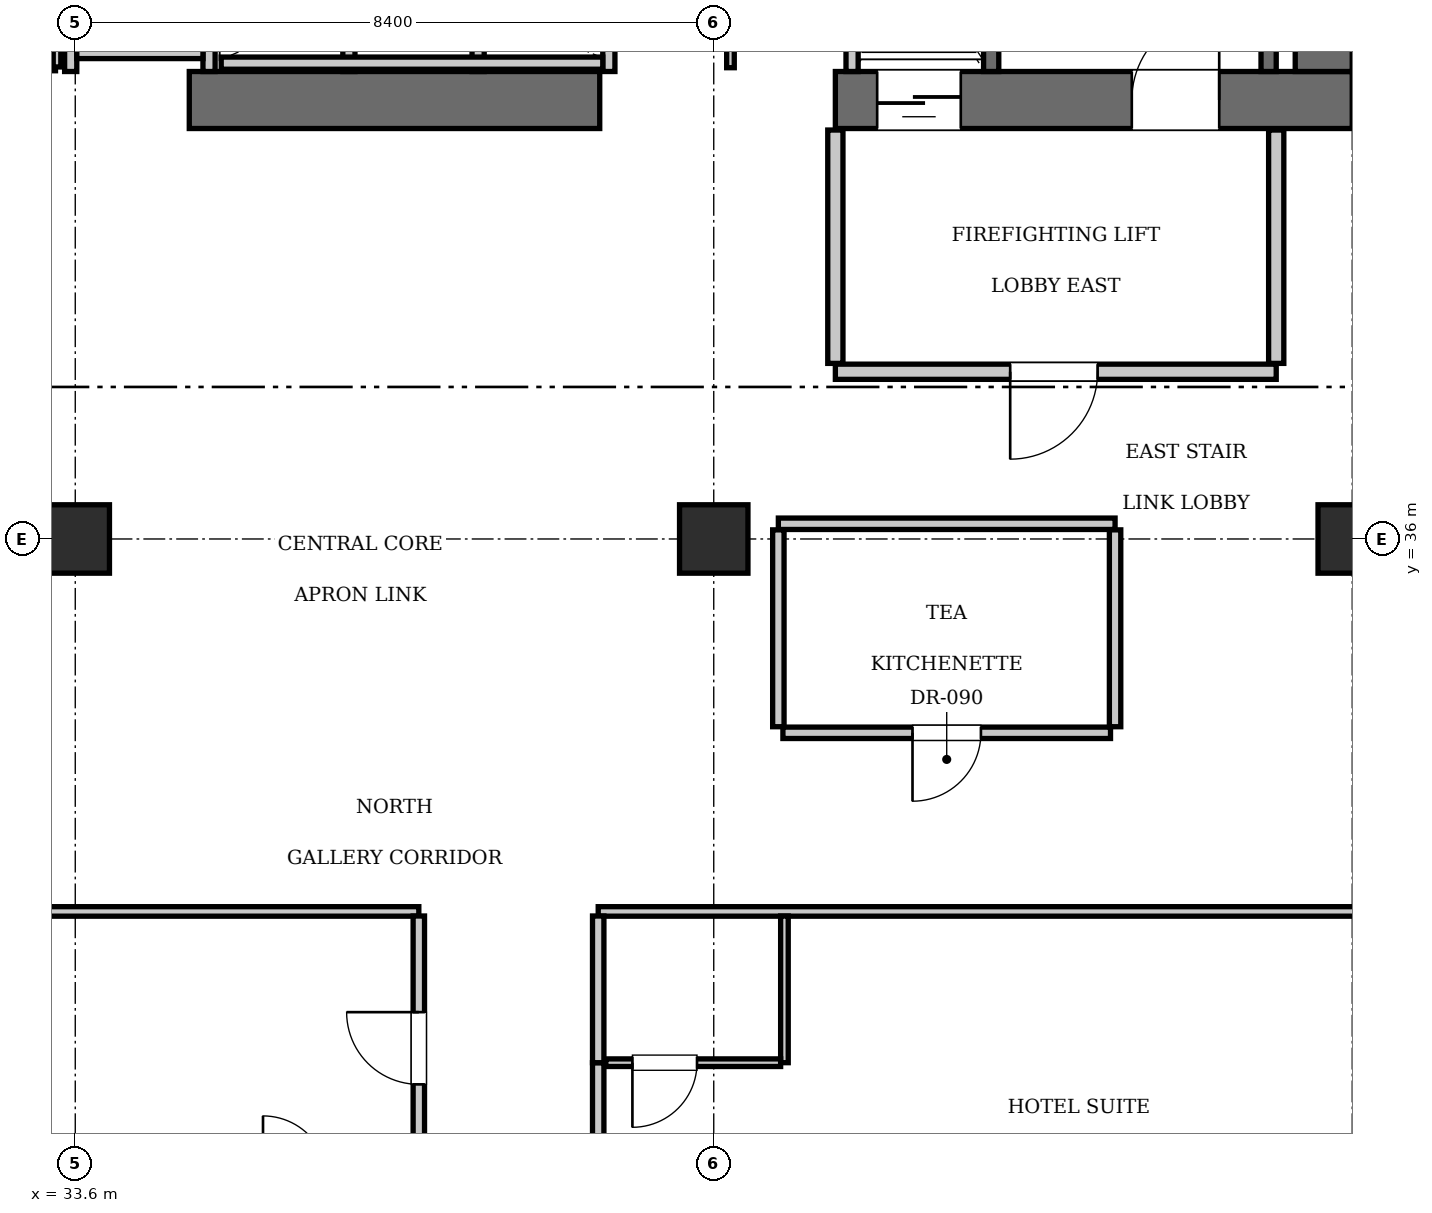
"""IFC4 building model, lengths in metres.
Left out: names, types, materials, properties, quantities, classifications, styles, units other than length and angle.
Written with IfcOpenShell. Run it as: python <this file> out.ifc"""

import sys

from ifc_helpers import new_model, si_unit, direction, frame, frame_2d, origin, origin_2d, place, context, subcontext, project, spatial, rectangle, extrude, element, fill, save


model = new_model("IFC4")
c1 = context("Model", 3, precision=1e-05, world=origin(), true_north=direction((0.0, 1.0)))
c2 = subcontext(c1, "Body", "Model", "MODEL_VIEW")
j1 = project(units=[si_unit("LENGTHUNIT", "METRE"), si_unit("PLANEANGLEUNIT", "RADIAN")], contexts=[c1])
p1 = place(None, origin())
s1 = spatial("IfcSite", under=j1, at=p1, CompositionType="ELEMENT")
p2 = place(p1, origin())
s2 = spatial("IfcBuilding", under=s1, at=p2, CompositionType="ELEMENT")
p3 = place(p2, frame((0.0, 0.0, 154.35)))
s3 = spatial("IfcBuildingStorey", under=s2, at=p3, CompositionType="ELEMENT", Elevation=154.35)
p4 = place(p3, frame((35.1, 41.775, 0.0), z_axis=(0.0, 0.0, 1.0), x_axis=(1.0, 0.0, 0.0)))
e1 = element("IfcWall", 1, at=p4, inside=s3, PredefinedType="SHEAR", context=c2, shape_type="SweptSolid", body=[
    extrude(rectangle(XDim=5.4, YDim=0.75, at=frame_2d((2.7, 0.0))), origin(), (0.0, 0.0, 1.0), 3.85),
])
p5 = place(p3, frame((43.6, 41.775, 0.0), z_axis=(0.0, 0.0, 1.0), x_axis=(1.0, 0.0, 0.0)))
e2 = element("IfcWall", 2, at=p5, inside=s3, PredefinedType="SHEAR", context=c2, shape_type="SweptSolid", body=[
    extrude(rectangle(XDim=6.8, YDim=0.75, at=frame_2d((3.4, 0.0))), origin(), (0.0, 0.0, 1.0), 3.85),
])
p6 = place(p5, frame((3.9, 0.0, 0.0)))
e3 = element("IfcOpeningElement", 3, at=p6, cuts=e2, PredefinedType="OPENING", context=c2, shape_type="SweptSolid", body=[
    extrude(rectangle(XDim=1.15, YDim=2.15, at=frame_2d((0.575, 1.075))), frame((0.0, 0.385, 0.0), z_axis=(0.0, -1.0, 0.0), x_axis=(1.0, 0.0, 0.0)), (0.0, 0.0, 1.0), 0.77),
])
p7 = place(p5, frame((0.55, 0.0, 0.0)))
e4 = element("IfcOpeningElement", 4, at=p7, cuts=e2, PredefinedType="OPENING", context=c2, shape_type="SweptSolid", body=[
    extrude(rectangle(XDim=1.1, YDim=2.2, at=frame_2d((0.55, 1.1))), frame((0.0, 0.385, 0.0), z_axis=(0.0, -1.0, 0.0), x_axis=(1.0, 0.0, 0.0)), (0.0, 0.0, 1.0), 0.77),
])
p8 = place(p3, frame((50.025, 42.15, 0.0), z_axis=(0.0, 0.0, 1.0), x_axis=(0.0, 1.0, 0.0)))
e5 = element("IfcWall", 5, at=p8, inside=s3, PredefinedType="SHEAR", context=c2, shape_type="SweptSolid", body=[
    extrude(rectangle(XDim=1.9, YDim=0.75, at=frame_2d((0.95, 0.0))), origin(), (0.0, 0.0, 1.0), 3.85),
])
for number, where, z_axis, x_axis in (
    (6, (33.6, 36.0, 0.0), (0.0, 0.0, 1.0), (1.0, 0.0, 0.0)),
    (7, (42.0, 36.0, 0.0), (0.0, 0.0, 1.0), (1.0, 0.0, 0.0)),
    (8, (50.4, 36.0, 0.0), (0.0, 0.0, 1.0), (1.0, 0.0, 0.0)),
):
    element("IfcColumn", number, at=place(p3, frame(where, z_axis=z_axis, x_axis=x_axis)), inside=s3, PredefinedType="COLUMN", context=c2, shape_type="SweptSolid", body=[
        extrude(rectangle(XDim=0.9, YDim=0.9, at=origin_2d()), origin(), (0.0, 0.0, 1.0), 3.85),
    ])
p9 = place(p3, frame((45.65, 42.15, 0.0), z_axis=(0.0, 0.0, 1.0), x_axis=(0.0, 1.0, 0.0)))
e9 = element("IfcWall", 9, at=p9, inside=s3, PredefinedType="SOLIDWALL", context=c2, shape_type="SweptSolid", body=[
    extrude(rectangle(XDim=9.0, YDim=0.2, at=frame_2d((4.5, 0.0))), origin(), (0.0, 0.0, 1.0), 3.61),
])
p10 = place(p3, frame((49.3, 42.15, 0.0), z_axis=(0.0, 0.0, 1.0), x_axis=(0.0, 1.0, 0.0)))
e10 = element("IfcWall", 10, at=p10, inside=s3, PredefinedType="SOLIDWALL", context=c2, shape_type="SweptSolid", body=[
    extrude(rectangle(XDim=1.87, YDim=0.2, at=frame_2d((0.935, 0.0))), origin(), (0.0, 0.0, 1.0), 3.61),
])
p11 = place(p3, frame((43.82, 42.15, 0.0), z_axis=(0.0, 0.0, 1.0), x_axis=(0.0, 1.0, 0.0)))
e11 = element("IfcWall", 11, at=p11, inside=s3, PredefinedType="SOLIDWALL", context=c2, shape_type="SweptSolid", body=[
    extrude(rectangle(XDim=2.59, YDim=0.16, at=frame_2d((1.295, 0.0))), origin(), (0.0, 0.0, 1.0), 3.61),
])
for number, where, z_axis, x_axis in (
    (12, (37.2, 42.15, 0.0), (0.0, 0.0, 1.0), (0.0, 1.0, 0.0)),
    (13, (38.9, 42.15, 0.0), (0.0, 0.0, 1.0), (0.0, 1.0, 0.0)),
    (14, (40.62, 42.15, 0.0), (0.0, 0.0, 1.0), (0.0, 1.0, 0.0)),
):
    element("IfcWall", number, at=place(p3, frame(where, z_axis=z_axis, x_axis=x_axis)), inside=s3, PredefinedType="SOLIDWALL", context=c2, shape_type="SweptSolid", body=[
        extrude(rectangle(XDim=2.2, YDim=0.16, at=frame_2d((1.1, 0.0))), origin(), (0.0, 0.0, 1.0), 3.61),
    ])
p12 = place(p3, frame((35.52, 42.26, 0.0), z_axis=(0.0, 0.0, 1.0), x_axis=(1.0, 0.0, 0.0)))
e15 = element("IfcWall", 15, at=p12, inside=s3, PredefinedType="SOLIDWALL", context=c2, shape_type="SweptSolid", body=[
    extrude(rectangle(XDim=5.02, YDim=0.16, at=frame_2d((2.51, 0.0))), origin(), (0.0, 0.0, 1.0), 3.61),
])
for number, where, z_axis, x_axis in (
    (16, (33.54, 42.15, 0.0), (0.0, 0.0, 1.0), (0.0, 1.0, 0.0)),
    (17, (35.36, 42.15, 0.0), (0.0, 0.0, 1.0), (0.0, 1.0, 0.0)),
):
    element("IfcWall", number, at=place(p3, frame(where, z_axis=z_axis, x_axis=x_axis)), inside=s3, PredefinedType="SOLIDWALL", context=c2, shape_type="SweptSolid", body=[
        extrude(rectangle(XDim=2.25, YDim=0.16, at=frame_2d((1.125, 0.0))), origin(), (0.0, 0.0, 1.0), 3.61),
    ])
p13 = place(p3, frame((33.62, 42.4, 0.0), z_axis=(0.0, 0.0, 1.0), x_axis=(1.0, 0.0, 0.0)))
e18 = element("IfcWall", 18, at=p13, inside=s3, PredefinedType="SOLIDWALL", context=c2, shape_type="SweptSolid", body=[
    extrude(rectangle(XDim=1.66, YDim=0.16, at=frame_2d((0.83, 0.0))), origin(), (0.0, 0.0, 1.0), 3.61),
])
p14 = place(p3, frame((43.6, 38.2, 0.0), z_axis=(0.0, 0.0, 1.0), x_axis=(1.0, 0.0, 0.0)))
e19 = element("IfcWall", 19, at=p14, inside=s3, PredefinedType="PARTITIONING", context=c2, shape_type="SweptSolid", body=[
    extrude(rectangle(XDim=5.8, YDim=0.2, at=frame_2d((2.9, 0.0))), origin(), (0.0, 0.0, 1.0), 3.61),
])
p15 = place(p14, frame((2.3, 0.0, 0.0)))
e20 = element("IfcOpeningElement", 20, at=p15, cuts=e19, PredefinedType="OPENING", context=c2, shape_type="SweptSolid", body=[
    extrude(rectangle(XDim=1.15, YDim=2.15, at=frame_2d((0.575, 1.075))), frame((0.0, 0.11, 0.0), z_axis=(0.0, -1.0, 0.0), x_axis=(1.0, 0.0, 0.0)), (0.0, 0.0, 1.0), 0.22),
])
for number, where, z_axis, x_axis in (
    (21, (43.6, 38.31, 0.0), (0.0, 0.0, 1.0), (0.0, 1.0, 0.0)),
    (22, (49.4, 38.31, 0.0), (0.0, 0.0, 1.0), (0.0, 1.0, 0.0)),
):
    element("IfcWall", number, at=place(p3, frame(where, z_axis=z_axis, x_axis=x_axis)), inside=s3, PredefinedType="PARTITIONING", context=c2, shape_type="SweptSolid", body=[
        extrude(rectangle(XDim=3.07, YDim=0.2, at=frame_2d((1.535, 0.0))), origin(), (0.0, 0.0, 1.0), 3.61),
    ])
p16 = place(p3, frame((32.02, 42.21, 0.0), z_axis=(0.0, 0.0, 1.0), x_axis=(1.0, 0.0, 0.0)))
e23 = element("IfcWall", 23, at=p16, inside=s3, PredefinedType="PARTITIONING", context=c2, shape_type="SweptSolid", body=[
    extrude(rectangle(XDim=1.32, YDim=0.1, at=frame_2d((0.66, 0.0))), origin(), (0.0, 0.0, 1.0), 3.61),
])
p17 = place(p16, frame((0.24, 0.0, 0.0)))
e24 = element("IfcOpeningElement", 24, at=p17, cuts=e23, PredefinedType="OPENING", context=c2, shape_type="SweptSolid", body=[
    extrude(rectangle(XDim=0.8, YDim=2.05, at=frame_2d((0.4, 1.025))), frame((0.0, 0.06, 0.0), z_axis=(0.0, -1.0, 0.0), x_axis=(1.0, 0.0, 0.0)), (0.0, 0.0, 1.0), 0.12),
])
p18 = place(p3, frame((33.36, 42.21, 0.0), z_axis=(0.0, 0.0, 1.0), x_axis=(0.0, 1.0, 0.0)))
e25 = element("IfcWall", 25, at=p18, inside=s3, PredefinedType="PARTITIONING", context=c2, shape_type="SweptSolid", body=[
    extrude(rectangle(XDim=2.73, YDim=0.1, at=frame_2d((1.365, 0.0))), origin(), (0.0, 0.0, 1.0), 3.61),
])
p19 = place(p3, frame((42.22, 42.2, 0.0), z_axis=(0.0, 0.0, 1.0), x_axis=(0.0, 1.0, 0.0)))
e26 = element("IfcWall", 26, at=p19, inside=s3, PredefinedType="PARTITIONING", context=c2, shape_type="SweptSolid", body=[
    extrude(rectangle(XDim=2.76, YDim=0.1, at=frame_2d((1.38, 0.0))), origin(), (0.0, 0.0, 1.0), 3.61),
])
p20 = place(p19, frame((0.65, 0.0, 0.0)))
e27 = element("IfcOpeningElement", 27, at=p20, cuts=e26, PredefinedType="OPENING", context=c2, shape_type="SweptSolid", body=[
    extrude(rectangle(XDim=0.8, YDim=2.05, at=frame_2d((0.4, 1.025))), frame((0.0, 0.06, 0.0), z_axis=(0.0, -1.0, 0.0), x_axis=(1.0, 0.0, 0.0)), (0.0, 0.0, 1.0), 0.12),
])
p21 = place(p3, frame((42.85, 36.2, 0.0), z_axis=(0.0, 0.0, 1.0), x_axis=(1.0, 0.0, 0.0)))
e28 = element("IfcWall", 28, at=p21, inside=s3, PredefinedType="PARTITIONING", context=c2, shape_type="SweptSolid", body=[
    extrude(rectangle(XDim=4.43, YDim=0.15, at=frame_2d((2.215, 0.0))), origin(), (0.0, 0.0, 1.0), 3.61),
])
for number, where, z_axis, x_axis in (
    (29, (42.85, 33.53, 0.0), (0.0, 0.0, 1.0), (0.0, 1.0, 0.0)),
    (30, (47.28, 33.53, 0.0), (0.0, 0.0, 1.0), (0.0, 1.0, 0.0)),
):
    element("IfcWall", number, at=place(p3, frame(where, z_axis=z_axis, x_axis=x_axis)), inside=s3, PredefinedType="PARTITIONING", context=c2, shape_type="SweptSolid", body=[
        extrude(rectangle(XDim=2.59, YDim=0.15, at=frame_2d((1.295, 0.0))), origin(), (0.0, 0.0, 1.0), 3.61),
    ])
p22 = place(p3, frame((42.91, 33.45, 0.0), z_axis=(0.0, 0.0, 1.0), x_axis=(1.0, 0.0, 0.0)))
e31 = element("IfcWall", 31, at=p22, inside=s3, PredefinedType="PARTITIONING", context=c2, shape_type="SweptSolid", body=[
    extrude(rectangle(XDim=4.31, YDim=0.15, at=frame_2d((2.155, 0.0))), origin(), (0.0, 0.0, 1.0), 3.61),
])
p23 = place(p22, frame((1.705, 0.0, 0.0)))
e32 = element("IfcOpeningElement", 32, at=p23, cuts=e31, PredefinedType="OPENING", context=c2, shape_type="SweptSolid", body=[
    extrude(rectangle(XDim=0.9, YDim=2.1, at=frame_2d((0.45, 1.05))), frame((0.0, 0.085, 0.0), z_axis=(0.0, -1.0, 0.0), x_axis=(1.0, 0.0, 0.0)), (0.0, 0.0, 1.0), 0.17),
])
p24 = place(p3, frame((13.2, 31.1, 0.0), z_axis=(0.0, 0.0, 1.0), x_axis=(1.0, 0.0, 0.0)))
e33 = element("IfcWall", 33, at=p24, inside=s3, PredefinedType="PARTITIONING", context=c2, shape_type="SweptSolid", body=[
    extrude(rectangle(XDim=24.92, YDim=0.125, at=frame_2d((12.46, 0.0))), origin(), (0.0, 0.0, 1.0), 3.61),
])
p25 = place(p3, frame((40.48, 31.1, 0.0), z_axis=(0.0, 0.0, 1.0), x_axis=(1.0, 0.0, 0.0)))
e34 = element("IfcWall", 34, at=p25, inside=s3, PredefinedType="PARTITIONING", context=c2, shape_type="SweptSolid", body=[
    extrude(rectangle(XDim=21.92, YDim=0.125, at=frame_2d((10.96, 0.0))), origin(), (0.0, 0.0, 1.0), 3.61),
])
p26 = place(p3, frame((38.12, 27.56, 0.0), z_axis=(0.0, 0.0, 1.0), x_axis=(0.0, 1.0, 0.0)))
e35 = element("IfcWall", 35, at=p26, inside=s3, PredefinedType="PARTITIONING", context=c2, shape_type="SweptSolid", body=[
    extrude(rectangle(XDim=3.48, YDim=0.15, at=frame_2d((1.74, 0.0))), origin(), (0.0, 0.0, 1.0), 3.61),
])
p27 = place(p26, frame((1.265, 0.0, 0.0)))
e36 = element("IfcOpeningElement", 36, at=p27, cuts=e35, PredefinedType="OPENING", context=c2, shape_type="SweptSolid", body=[
    extrude(rectangle(XDim=0.95, YDim=2.15, at=frame_2d((0.475, 1.075))), frame((0.0, 0.085, 0.0), z_axis=(0.0, -1.0, 0.0), x_axis=(1.0, 0.0, 0.0)), (0.0, 0.0, 1.0), 0.17),
])
p28 = place(p3, frame((40.48, 25.63, 0.0), z_axis=(0.0, 0.0, 1.0), x_axis=(0.0, 1.0, 0.0)))
e37 = element("IfcWall", 37, at=p28, inside=s3, PredefinedType="PARTITIONING", context=c2, shape_type="SweptSolid", body=[
    extrude(rectangle(XDim=3.48, YDim=0.15, at=frame_2d((1.74, 0.0))), origin(), (0.0, 0.0, 1.0), 3.61),
])
p29 = place(p28, frame((1.265, 0.0, 0.0)))
e38 = element("IfcOpeningElement", 38, at=p29, cuts=e37, PredefinedType="OPENING", context=c2, shape_type="SweptSolid", body=[
    extrude(rectangle(XDim=0.95, YDim=2.15, at=frame_2d((0.475, 1.075))), frame((0.0, 0.085, 0.0), z_axis=(0.0, -1.0, 0.0), x_axis=(1.0, 0.0, 0.0)), (0.0, 0.0, 1.0), 0.17),
])
p30 = place(p3, frame((40.48, 29.11, 0.0), z_axis=(0.0, 0.0, 1.0), x_axis=(0.0, 1.0, 0.0)))
e39 = element("IfcWall", 39, at=p30, inside=s3, PredefinedType="PARTITIONING", context=c2, shape_type="SweptSolid", body=[
    extrude(rectangle(XDim=1.93, YDim=0.15, at=frame_2d((0.965, 0.0))), origin(), (0.0, 0.0, 1.0), 3.61),
])
p31 = place(p3, frame((42.93, 29.11, 0.0), z_axis=(0.0, 0.0, 1.0), x_axis=(0.0, 1.0, 0.0)))
e40 = element("IfcWall", 40, at=p31, inside=s3, PredefinedType="PARTITIONING", context=c2, shape_type="SweptSolid", body=[
    extrude(rectangle(XDim=1.93, YDim=0.1, at=frame_2d((0.965, 0.0))), origin(), (0.0, 0.0, 1.0), 3.61),
])
p32 = place(p3, frame((40.58, 29.11, 0.0), z_axis=(0.0, 0.0, 1.0), x_axis=(1.0, 0.0, 0.0)))
e41 = element("IfcWall", 41, at=p32, inside=s3, PredefinedType="PARTITIONING", context=c2, shape_type="SweptSolid", body=[
    extrude(rectangle(XDim=2.3, YDim=0.1, at=frame_2d((1.15, 0.0))), origin(), (0.0, 0.0, 1.0), 3.61),
])
p33 = place(p32, frame((0.35, 0.0, 0.0)))
e42 = element("IfcOpeningElement", 42, at=p33, cuts=e41, PredefinedType="OPENING", context=c2, shape_type="SweptSolid", body=[
    extrude(rectangle(XDim=0.85, YDim=2.1, at=frame_2d((0.425, 1.05))), frame((0.0, 0.06, 0.0), z_axis=(0.0, -1.0, 0.0), x_axis=(1.0, 0.0, 0.0)), (0.0, 0.0, 1.0), 0.12),
])
p34 = place(p6, origin())
e43 = element("IfcDoor", 43, at=p34, inside=s3, OperationType="SINGLE_SWING_RIGHT", PredefinedType="DOOR", context=c2, shape_type="SweptSolid", body=[
    extrude(rectangle(XDim=1.15, YDim=2.15, at=frame_2d((0.575, 1.075))), frame((0.0, 0.025, 0.0), z_axis=(0.0, -1.0, 0.0), x_axis=(1.0, 0.0, 0.0)), (0.0, 0.0, 1.0), 0.05),
])
fill(e3, e43)
p35 = place(p7, frame((1.1, 0.0, 0.0), z_axis=(0.0, 0.0, 1.0), x_axis=(-1.0, 0.0, 0.0)))
e44 = element("IfcDoor", 44, at=p35, inside=s3, OperationType="SLIDING_TO_LEFT", PredefinedType="DOOR", context=c2, shape_type="SweptSolid", body=[
    extrude(rectangle(XDim=1.1, YDim=2.2, at=frame_2d((0.55, 1.1))), frame((0.0, 0.025, 0.0), z_axis=(0.0, -1.0, 0.0), x_axis=(1.0, 0.0, 0.0)), (0.0, 0.0, 1.0), 0.05),
])
fill(e4, e44)
p36 = place(p15, frame((1.15, 0.0, 0.0), z_axis=(0.0, 0.0, 1.0), x_axis=(-1.0, 0.0, 0.0)))
e45 = element("IfcDoor", 45, at=p36, inside=s3, OperationType="SINGLE_SWING_RIGHT", PredefinedType="DOOR", context=c2, shape_type="SweptSolid", body=[
    extrude(rectangle(XDim=1.15, YDim=2.15, at=frame_2d((0.575, 1.075))), frame((0.0, 0.025, 0.0), z_axis=(0.0, -1.0, 0.0), x_axis=(1.0, 0.0, 0.0)), (0.0, 0.0, 1.0), 0.05),
])
fill(e20, e45)
p37 = place(p23, frame((0.9, 0.0, 0.0), z_axis=(0.0, 0.0, 1.0), x_axis=(-1.0, 0.0, 0.0)))
e46 = element("IfcDoor", 46, at=p37, inside=s3, OperationType="SINGLE_SWING_RIGHT", PredefinedType="DOOR", context=c2, shape_type="SweptSolid", body=[
    extrude(rectangle(XDim=0.9, YDim=2.1, at=frame_2d((0.45, 1.05))), frame((0.0, 0.025, 0.0), z_axis=(0.0, -1.0, 0.0), x_axis=(1.0, 0.0, 0.0)), (0.0, 0.0, 1.0), 0.05),
])
fill(e32, e46)
p38 = place(p27, origin())
e47 = element("IfcDoor", 47, at=p38, inside=s3, OperationType="SINGLE_SWING_RIGHT", PredefinedType="DOOR", context=c2, shape_type="SweptSolid", body=[
    extrude(rectangle(XDim=0.95, YDim=2.15, at=frame_2d((0.475, 1.075))), frame((0.0, 0.025, 0.0), z_axis=(0.0, -1.0, 0.0), x_axis=(1.0, 0.0, 0.0)), (0.0, 0.0, 1.0), 0.05),
])
fill(e36, e47)
p39 = place(p33, frame((0.85, 0.0, 0.0), z_axis=(0.0, 0.0, 1.0), x_axis=(-1.0, 0.0, 0.0)))
e48 = element("IfcDoor", 48, at=p39, inside=s3, OperationType="SINGLE_SWING_RIGHT", PredefinedType="DOOR", context=c2, shape_type="SweptSolid", body=[
    extrude(rectangle(XDim=0.85, YDim=2.1, at=frame_2d((0.425, 1.05))), frame((0.0, 0.025, 0.0), z_axis=(0.0, -1.0, 0.0), x_axis=(1.0, 0.0, 0.0)), (0.0, 0.0, 1.0), 0.05),
])
fill(e42, e48)
save(model, sys.argv[1])
